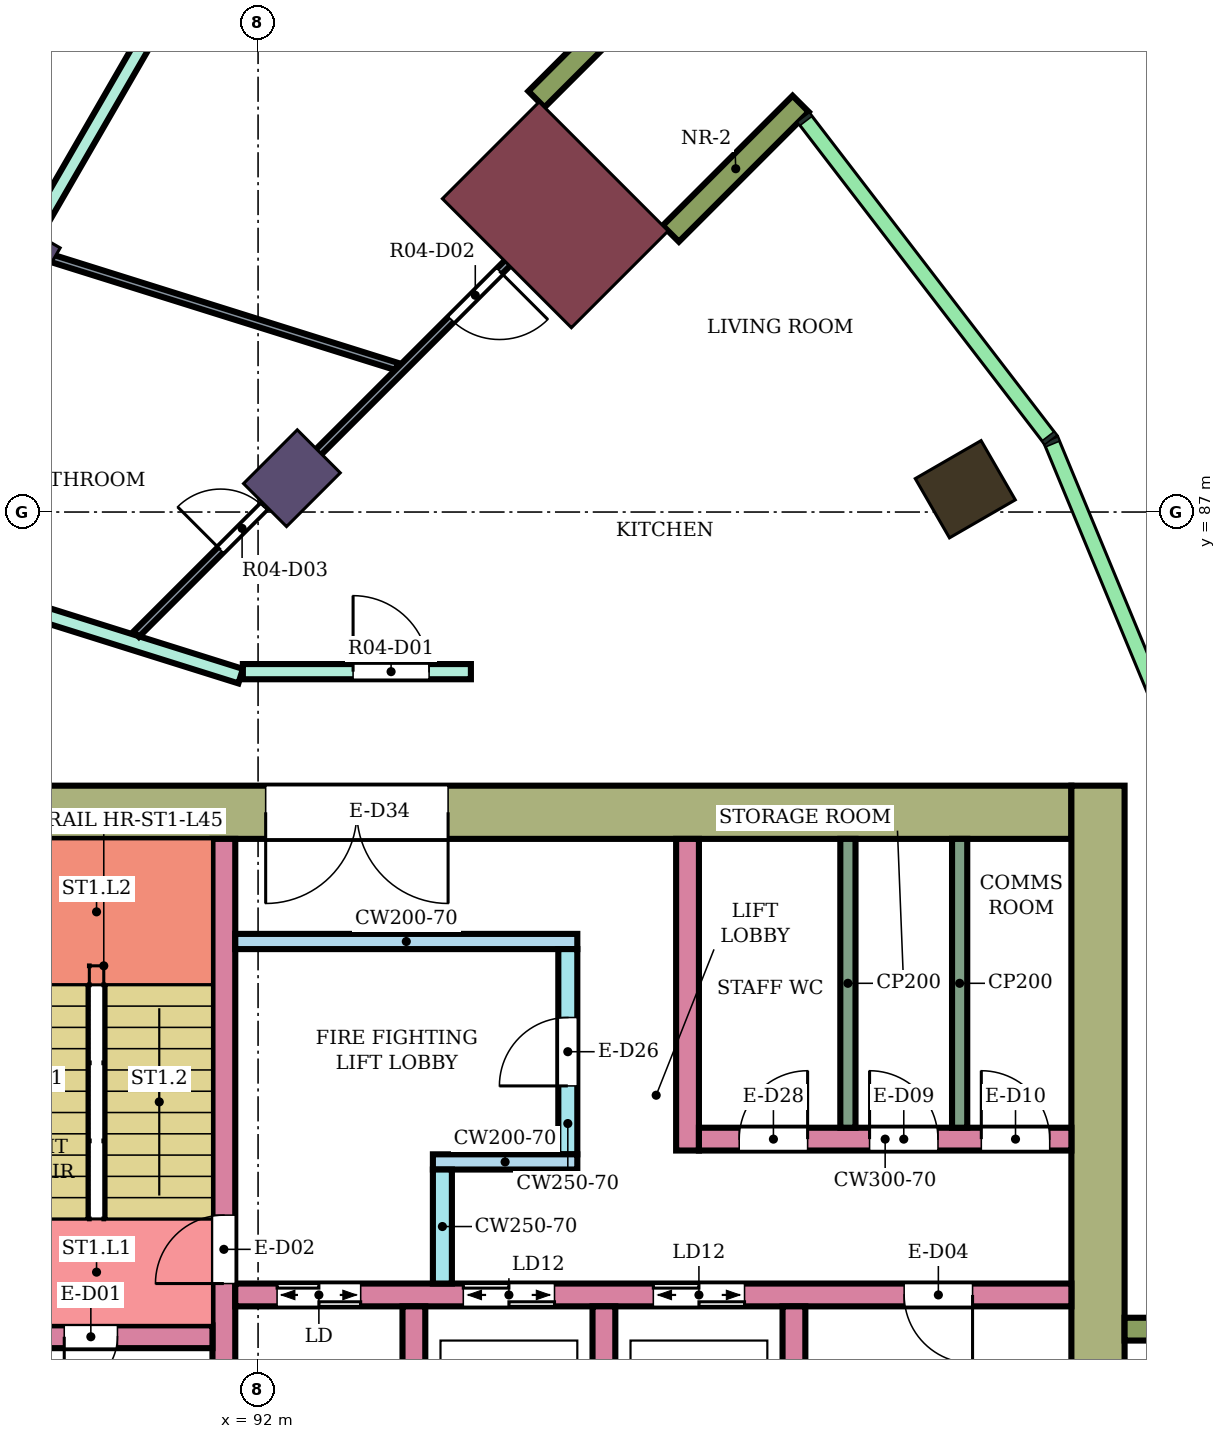
"""IFC4 building model, lengths in metres.
Left out: names, types, materials, properties, quantities, classifications, styles, units other than length and angle.
Written with IfcOpenShell. Run it as: python <this file> out.ifc"""

import sys

from ifc_helpers import new_model, si_unit, direction, frame, frame_2d, origin, origin_2d, place, context, subcontext, project, spatial, rectangle, extrude, element, fill, save


model = new_model("IFC4")
c1 = context("Model", 3, precision=1e-05, world=origin(), true_north=direction((0.0, 1.0)))
c2 = subcontext(c1, "Body", "Model", "MODEL_VIEW")
j1 = project(units=[si_unit("LENGTHUNIT", "METRE"), si_unit("PLANEANGLEUNIT", "RADIAN")], contexts=[c1])
p1 = place(None, origin())
s1 = spatial("IfcSite", under=j1, at=p1, CompositionType="ELEMENT")
p2 = place(p1, origin())
s2 = spatial("IfcBuilding", under=s1, at=p2, CompositionType="ELEMENT")
p3 = place(p2, frame((0.0, 0.0, 194.6)))
s3 = spatial("IfcBuildingStorey", under=s2, at=p3, CompositionType="ELEMENT", Elevation=194.6)
p4 = place(p3, frame((101.304, 87.3, 0.0), z_axis=(0.0, 0.0, 1.0), x_axis=(0.866025403784, 0.5, 0.0)))
e1 = element("IfcColumn", 1, at=p4, inside=s3, PredefinedType="COLUMN", context=c2, shape_type="SweptSolid", body=[
    extrude(rectangle(XDim=1.0, YDim=0.9, at=origin_2d()), origin(), (0.0, 0.0, 1.0), 4.1),
])
for number, where, z_axis, x_axis in (
    (2, (92.445, 87.445, 0.0), (0.0, 0.0, 1.0), (0.707, 0.707, 0.0)),
    (3, (88.8, 90.242, 0.0), (0.0, 0.0, 1.0), (0.5, 0.866, 0.0)),
):
    element("IfcColumn", number, at=place(p3, frame(where, z_axis=z_axis, x_axis=x_axis)), inside=s3, PredefinedType="COLUMN", context=c2, shape_type="SweptSolid", body=[
        extrude(rectangle(XDim=1.0, YDim=0.8, at=origin_2d()), origin(), (0.0, 0.0, 1.0), 4.1),
    ])
p5 = place(p3, frame((95.91, 90.91, 0.0), z_axis=(0.0, 0.0, 1.0), x_axis=(0.707106781187, 0.707106781187, 0.0)))
e4 = element("IfcColumn", 4, at=p5, inside=s3, PredefinedType="COLUMN", context=c2, shape_type="SweptSolid", body=[
    extrude(rectangle(XDim=1.8, YDim=2.4, at=origin_2d()), origin(), (0.0, 0.0, 1.0), 4.1),
])
p6 = place(p3, frame((87.9, 83.05, 0.0), z_axis=(0.0, 0.0, 1.0), x_axis=(1.0, 0.0, 0.0)))
e5 = element("IfcWall", 5, at=p6, inside=s3, PredefinedType="SHEAR", context=c2, shape_type="SweptSolid", body=[
    extrude(rectangle(XDim=14.8, YDim=0.7, at=frame_2d((7.4, 0.0))), origin(), (0.0, 0.0, 1.0), 3.78),
])
p7 = place(p6, frame((4.2, 0.0, 0.0)))
e6 = element("IfcOpeningElement", 6, at=p7, cuts=e5, PredefinedType="OPENING", context=c2, shape_type="SweptSolid", body=[
    extrude(rectangle(XDim=2.4, YDim=2.4, at=frame_2d((1.2, 1.2))), frame((0.0, 0.36, 0.0), z_axis=(0.0, -1.0, 0.0), x_axis=(1.0, 0.0, 0.0)), (0.0, 0.0, 1.0), 0.72),
])
p8 = place(p3, frame((103.05, 66.6, 0.0), z_axis=(0.0, 0.0, 1.0), x_axis=(0.0, 1.0, 0.0)))
e7 = element("IfcWall", 7, at=p8, inside=s3, PredefinedType="SHEAR", context=c2, shape_type="SweptSolid", body=[
    extrude(rectangle(XDim=16.8, YDim=0.7, at=frame_2d((8.4, 0.0))), origin(), (0.0, 0.0, 1.0), 3.78),
])
p9 = place(p3, frame((91.55, 75.0, 0.0), z_axis=(0.0, 0.0, 1.0), x_axis=(0.0, 1.0, 0.0)))
e8 = element("IfcWall", 8, at=p9, inside=s3, PredefinedType="SHEAR", context=c2, shape_type="SweptSolid", body=[
    extrude(rectangle(XDim=7.7, YDim=0.3, at=frame_2d((3.85, 0.0))), origin(), (0.0, 0.0, 1.0), 3.78),
])
p10 = place(p9, frame((1.85, 0.0, 0.0)))
e9 = element("IfcOpeningElement", 9, at=p10, cuts=e8, PredefinedType="OPENING", context=c2, shape_type="SweptSolid", body=[
    extrude(rectangle(XDim=0.9, YDim=2.1, at=frame_2d((0.45, 1.05))), frame((0.0, 0.16, 0.0), z_axis=(0.0, -1.0, 0.0), x_axis=(1.0, 0.0, 0.0)), (0.0, 0.0, 1.0), 0.32),
])
p11 = place(p3, frame((88.35, 76.15, 0.0), z_axis=(0.0, 0.0, 1.0), x_axis=(1.0, 0.0, 0.0)))
e10 = element("IfcWall", 10, at=p11, inside=s3, PredefinedType="SHEAR", context=c2, shape_type="SweptSolid", body=[
    extrude(rectangle(XDim=3.05, YDim=0.3, at=frame_2d((1.525, 0.0))), origin(), (0.0, 0.0, 1.0), 3.78),
])
p12 = place(p11, frame((1.1, 0.0, 0.0)))
e11 = element("IfcOpeningElement", 11, at=p12, cuts=e10, PredefinedType="OPENING", context=c2, shape_type="SweptSolid", body=[
    extrude(rectangle(XDim=0.7, YDim=2.0, at=frame_2d((0.35, 1.0))), frame((0.0, 0.16, 0.0), z_axis=(0.0, -1.0, 0.0), x_axis=(1.0, 0.0, 0.0)), (0.0, 0.0, 1.0), 0.32),
])
p13 = place(p3, frame((91.7, 76.7, 0.0), z_axis=(0.0, 0.0, 1.0), x_axis=(1.0, 0.0, 0.0)))
e12 = element("IfcWall", 12, at=p13, inside=s3, PredefinedType="SHEAR", context=c2, shape_type="SweptSolid", body=[
    extrude(rectangle(XDim=11.0, YDim=0.3, at=frame_2d((5.5, 0.0))), origin(), (0.0, 0.0, 1.0), 3.78),
])
p14 = place(p13, frame((0.55, 0.0, 0.0)))
e13 = element("IfcOpeningElement", 13, at=p14, cuts=e12, PredefinedType="OPENING", context=c2, shape_type="SweptSolid", body=[
    extrude(rectangle(XDim=1.1, YDim=2.1, at=frame_2d((0.55, 1.05))), frame((0.0, 0.16, 0.0), z_axis=(0.0, -1.0, 0.0), x_axis=(1.0, 0.0, 0.0)), (0.0, 0.0, 1.0), 0.32),
])
p15 = place(p13, frame((3.0, 0.0, 0.0)))
e14 = element("IfcOpeningElement", 14, at=p15, cuts=e12, PredefinedType="OPENING", context=c2, shape_type="SweptSolid", body=[
    extrude(rectangle(XDim=1.2, YDim=2.1, at=frame_2d((0.6, 1.05))), frame((0.0, 0.16, 0.0), z_axis=(0.0, -1.0, 0.0), x_axis=(1.0, 0.0, 0.0)), (0.0, 0.0, 1.0), 0.32),
])
p16 = place(p13, frame((5.5, 0.0, 0.0)))
e15 = element("IfcOpeningElement", 15, at=p16, cuts=e12, PredefinedType="OPENING", context=c2, shape_type="SweptSolid", body=[
    extrude(rectangle(XDim=1.2, YDim=2.1, at=frame_2d((0.6, 1.05))), frame((0.0, 0.16, 0.0), z_axis=(0.0, -1.0, 0.0), x_axis=(1.0, 0.0, 0.0)), (0.0, 0.0, 1.0), 0.32),
])
p17 = place(p13, frame((8.8, 0.0, 0.0)))
e16 = element("IfcOpeningElement", 16, at=p17, cuts=e12, PredefinedType="OPENING", context=c2, shape_type="SweptSolid", body=[
    extrude(rectangle(XDim=0.9, YDim=2.1, at=frame_2d((0.45, 1.05))), frame((0.0, 0.16, 0.0), z_axis=(0.0, -1.0, 0.0), x_axis=(1.0, 0.0, 0.0)), (0.0, 0.0, 1.0), 0.32),
])
for number, where, z_axis, x_axis in (
    (17, (94.05, 74.0, 0.0), (0.0, 0.0, 1.0), (0.0, 1.0, 0.0)),
    (18, (96.55, 74.0, 0.0), (0.0, 0.0, 1.0), (0.0, 1.0, 0.0)),
    (19, (99.05, 74.0, 0.0), (0.0, 0.0, 1.0), (0.0, 1.0, 0.0)),
):
    element("IfcWall", number, at=place(p3, frame(where, z_axis=z_axis, x_axis=x_axis)), inside=s3, PredefinedType="SHEAR", context=c2, shape_type="SweptSolid", body=[
        extrude(rectangle(XDim=2.55, YDim=0.3, at=frame_2d((1.275, 0.0))), origin(), (0.0, 0.0, 1.0), 3.78),
    ])
p18 = place(p3, frame((91.7, 81.35, 0.0), z_axis=(0.0, 0.0, 1.0), x_axis=(1.0, 0.0, 0.0)))
e20 = element("IfcWall", 20, at=p18, inside=s3, PredefinedType="SHEAR", context=c2, shape_type="SweptSolid", body=[
    extrude(rectangle(XDim=4.5, YDim=0.2, at=frame_2d((2.25, 0.0))), origin(), (0.0, 0.0, 1.0), 3.78),
])
p19 = place(p3, frame((96.075, 78.55, 0.0), z_axis=(0.0, 0.0, 1.0), x_axis=(0.0, 1.0, 0.0)))
e21 = element("IfcWall", 21, at=p19, inside=s3, PredefinedType="SHEAR", context=c2, shape_type="SweptSolid", body=[
    extrude(rectangle(XDim=2.7, YDim=0.25, at=frame_2d((1.35, 0.0))), origin(), (0.0, 0.0, 1.0), 3.78),
])
p20 = place(p19, frame((0.9, 0.0, 0.0)))
e22 = element("IfcOpeningElement", 22, at=p20, cuts=e21, PredefinedType="OPENING", context=c2, shape_type="SweptSolid", body=[
    extrude(rectangle(XDim=0.9, YDim=2.1, at=frame_2d((0.45, 1.05))), frame((0.0, 0.135, 0.0), z_axis=(0.0, -1.0, 0.0), x_axis=(1.0, 0.0, 0.0)), (0.0, 0.0, 1.0), 0.27),
])
p21 = place(p3, frame((94.3, 78.45, 0.0), z_axis=(0.0, 0.0, 1.0), x_axis=(1.0, 0.0, 0.0)))
e23 = element("IfcWall", 23, at=p21, inside=s3, PredefinedType="SHEAR", context=c2, shape_type="SweptSolid", body=[
    extrude(rectangle(XDim=1.9, YDim=0.2, at=frame_2d((0.95, 0.0))), origin(), (0.0, 0.0, 1.0), 3.78),
])
p22 = place(p3, frame((94.425, 76.85, 0.0), z_axis=(0.0, 0.0, 1.0), x_axis=(0.0, 1.0, 0.0)))
e24 = element("IfcWall", 24, at=p22, inside=s3, PredefinedType="SHEAR", context=c2, shape_type="SweptSolid", body=[
    extrude(rectangle(XDim=1.5, YDim=0.25, at=frame_2d((0.75, 0.0))), origin(), (0.0, 0.0, 1.0), 3.78),
])
p23 = place(p3, frame((97.65, 78.6, 0.0), z_axis=(0.0, 0.0, 1.0), x_axis=(0.0, 1.0, 0.0)))
e25 = element("IfcWall", 25, at=p23, inside=s3, PredefinedType="SHEAR", context=c2, shape_type="SweptSolid", body=[
    extrude(rectangle(XDim=4.1, YDim=0.3, at=frame_2d((2.05, 0.0))), origin(), (0.0, 0.0, 1.0), 3.78),
])
p24 = place(p3, frame((97.8, 78.75, 0.0), z_axis=(0.0, 0.0, 1.0), x_axis=(1.0, 0.0, 0.0)))
e26 = element("IfcWall", 26, at=p24, inside=s3, PredefinedType="SHEAR", context=c2, shape_type="SweptSolid", body=[
    extrude(rectangle(XDim=4.9, YDim=0.3, at=frame_2d((2.45, 0.0))), origin(), (0.0, 0.0, 1.0), 3.78),
])
p25 = place(p24, frame((0.53, 0.0, 0.0)))
e27 = element("IfcOpeningElement", 27, at=p25, cuts=e26, PredefinedType="OPENING", context=c2, shape_type="SweptSolid", body=[
    extrude(rectangle(XDim=0.9, YDim=2.1, at=frame_2d((0.45, 1.05))), frame((0.0, 0.16, 0.0), z_axis=(0.0, -1.0, 0.0), x_axis=(1.0, 0.0, 0.0)), (0.0, 0.0, 1.0), 0.32),
])
p26 = place(p24, frame((2.245, 0.0, 0.0)))
e28 = element("IfcOpeningElement", 28, at=p26, cuts=e26, PredefinedType="OPENING", context=c2, shape_type="SweptSolid", body=[
    extrude(rectangle(XDim=0.9, YDim=2.1, at=frame_2d((0.45, 1.05))), frame((0.0, 0.16, 0.0), z_axis=(0.0, -1.0, 0.0), x_axis=(1.0, 0.0, 0.0)), (0.0, 0.0, 1.0), 0.32),
])
p27 = place(p24, frame((3.715, 0.0, 0.0)))
e29 = element("IfcOpeningElement", 29, at=p27, cuts=e26, PredefinedType="OPENING", context=c2, shape_type="SweptSolid", body=[
    extrude(rectangle(XDim=0.9, YDim=2.1, at=frame_2d((0.45, 1.05))), frame((0.0, 0.16, 0.0), z_axis=(0.0, -1.0, 0.0), x_axis=(1.0, 0.0, 0.0)), (0.0, 0.0, 1.0), 0.32),
])
for number, where, z_axis, x_axis in (
    (30, (103.4, 76.25, 0.0), (0.0, 0.0, 1.0), (1.0, 0.0, 0.0)),
    (31, (97.43, 90.662, 0.0), (0.0, 0.0, 1.0), (0.707, 0.707, 0.0)),
    (32, (95.662, 92.43, 0.0), (0.0, 0.0, 1.0), (0.707, 0.707, 0.0)),
):
    element("IfcWall", number, at=place(p3, frame(where, z_axis=z_axis, x_axis=x_axis)), inside=s3, PredefinedType="NOTDEFINED", context=c2, shape_type="SweptSolid", body=[
        extrude(rectangle(XDim=2.416, YDim=0.3, at=frame_2d((1.208, 0.0))), origin(), (0.0, 0.0, 1.0), 4.1),
    ])
p28 = place(p3, frame((86.313, 86.554, 0.0), z_axis=(0.0, 0.0, 1.0), x_axis=(0.954081217458, -0.299548043717, 0.0)))
e33 = element("IfcWall", 33, at=p28, inside=s3, PredefinedType="PARTITIONING", context=c2, shape_type="SweptSolid", body=[
    extrude(rectangle(XDim=5.721, YDim=0.2, at=frame_2d((2.86, 0.0))), origin(), (0.0, 0.0, 1.0), 3.65),
])
p29 = place(p3, frame((86.676, 86.563, 0.0), z_axis=(0.0, 0.0, 1.0), x_axis=(0.500124310661, 0.865953621094, 0.0)))
e34 = element("IfcWall", 34, at=p29, inside=s3, PredefinedType="PARTITIONING", context=c2, shape_type="SweptSolid", body=[
    extrude(rectangle(XDim=12.446, YDim=0.2, at=frame_2d((6.223, 0.0))), origin(), (0.0, 0.0, 1.0), 3.65),
])
p30 = place(p3, frame((91.8, 84.9, 0.0), z_axis=(0.0, 0.0, 1.0), x_axis=(1.0, 0.0, 0.0)))
e35 = element("IfcWall", 35, at=p30, inside=s3, PredefinedType="PARTITIONING", context=c2, shape_type="SweptSolid", body=[
    extrude(rectangle(XDim=3.0, YDim=0.2, at=frame_2d((1.5, 0.0))), origin(), (0.0, 0.0, 1.0), 3.65),
])
p31 = place(p30, frame((1.45, 0.0, 0.0)))
e36 = element("IfcOpeningElement", 36, at=p31, cuts=e35, PredefinedType="OPENING", context=c2, shape_type="SweptSolid", body=[
    extrude(rectangle(XDim=1.0, YDim=2.1, at=frame_2d((0.5, 1.05))), frame((0.0, 0.11, 0.0), z_axis=(0.0, -1.0, 0.0), x_axis=(1.0, 0.0, 0.0)), (0.0, 0.0, 1.0), 0.22),
])
p32 = place(p3, frame((89.026, 90.419, 0.0), z_axis=(0.0, 0.0, 1.0), x_axis=(0.954217944154, -0.299112211476, 0.0)))
e37 = element("IfcWall", 37, at=p32, inside=s3, PredefinedType="PARTITIONING", context=c2, shape_type="SweptSolid", body=[
    extrude(rectangle(XDim=5.03, YDim=0.1, at=frame_2d((2.515, 0.0))), origin(), (0.0, 0.0, 1.0), 3.65),
])
p33 = place(p3, frame((90.397, 85.393, 0.0), z_axis=(0.0, 0.0, 1.0), x_axis=(0.707264750546, 0.706948776529, 0.0)))
e38 = element("IfcWall", 38, at=p33, inside=s3, PredefinedType="PARTITIONING", context=c2, shape_type="SweptSolid", body=[
    extrude(rectangle(XDim=8.499, YDim=0.1, at=frame_2d((4.25, 0.0))), origin(), (0.0, 0.0, 1.0), 3.65),
])
p34 = place(p33, frame((5.857, 0.0, 0.0)))
e39 = element("IfcOpeningElement", 39, at=p34, cuts=e38, PredefinedType="OPENING", context=c2, shape_type="SweptSolid", body=[
    extrude(rectangle(XDim=0.9, YDim=2.1, at=frame_2d((0.45, 1.05))), frame((0.0, 0.06, 0.0), z_axis=(0.0, -1.0, 0.0), x_axis=(1.0, 0.0, 0.0)), (0.0, 0.0, 1.0), 0.12),
])
p35 = place(p33, frame((1.569, 0.0, 0.0)))
e40 = element("IfcOpeningElement", 40, at=p35, cuts=e38, PredefinedType="OPENING", context=c2, shape_type="SweptSolid", body=[
    extrude(rectangle(XDim=0.8, YDim=2.1, at=frame_2d((0.4, 1.05))), frame((0.0, 0.06, 0.0), z_axis=(0.0, -1.0, 0.0), x_axis=(1.0, 0.0, 0.0)), (0.0, 0.0, 1.0), 0.12),
])
for number, where, z_axis, x_axis in (
    (41, (99.76, 78.9, 0.0), (0.0, 0.0, 1.0), (0.0, 1.0, 0.0)),
    (42, (101.23, 78.9, 0.0), (0.0, 0.0, 1.0), (0.0, 1.0, 0.0)),
):
    element("IfcWall", number, at=place(p3, frame(where, z_axis=z_axis, x_axis=x_axis)), inside=s3, PredefinedType="PARTITIONING", context=c2, shape_type="SweptSolid", body=[
        extrude(rectangle(XDim=3.8, YDim=0.2, at=frame_2d((1.9, 0.0))), origin(), (0.0, 0.0, 1.0), 3.78),
    ])
p36 = place(p31, origin())
e43 = element("IfcDoor", 43, at=p36, inside=s3, OperationType="SINGLE_SWING_LEFT", PredefinedType="DOOR", context=c2, shape_type="SweptSolid", body=[
    extrude(rectangle(XDim=1.0, YDim=2.1, at=frame_2d((0.5, 1.05))), frame((0.0, 0.025, 0.0), z_axis=(0.0, -1.0, 0.0), x_axis=(1.0, 0.0, 0.0)), (0.0, 0.0, 1.0), 0.05),
])
fill(e36, e43)
p37 = place(p34, frame((0.9, 0.0, 0.0), z_axis=(0.0, 0.0, 1.0), x_axis=(-1.0, 0.0, 0.0)))
e44 = element("IfcDoor", 44, at=p37, inside=s3, OperationType="SINGLE_SWING_LEFT", PredefinedType="DOOR", context=c2, shape_type="SweptSolid", body=[
    extrude(rectangle(XDim=0.9, YDim=2.1, at=frame_2d((0.45, 1.05))), frame((0.0, 0.025, 0.0), z_axis=(0.0, -1.0, 0.0), x_axis=(1.0, 0.0, 0.0)), (0.0, 0.0, 1.0), 0.05),
])
fill(e39, e44)
p38 = place(p35, origin())
e45 = element("IfcDoor", 45, at=p38, inside=s3, OperationType="SINGLE_SWING_LEFT", PredefinedType="DOOR", context=c2, shape_type="SweptSolid", body=[
    extrude(rectangle(XDim=0.8, YDim=2.1, at=frame_2d((0.4, 1.05))), frame((0.0, 0.025, 0.0), z_axis=(0.0, -1.0, 0.0), x_axis=(1.0, 0.0, 0.0)), (0.0, 0.0, 1.0), 0.05),
])
fill(e40, e45)
p39 = place(p12, frame((0.7, 0.0, 0.0), z_axis=(0.0, 0.0, 1.0), x_axis=(-1.0, 0.0, 0.0)))
e46 = element("IfcDoor", 46, at=p39, inside=s3, OperationType="SINGLE_SWING_RIGHT", PredefinedType="DOOR", context=c2, shape_type="SweptSolid", body=[
    extrude(rectangle(XDim=0.7, YDim=2.0, at=frame_2d((0.35, 1.0))), frame((0.0, 0.025, 0.0), z_axis=(0.0, -1.0, 0.0), x_axis=(1.0, 0.0, 0.0)), (0.0, 0.0, 1.0), 0.05),
])
fill(e11, e46)
p40 = place(p10, origin())
e47 = element("IfcDoor", 47, at=p40, inside=s3, OperationType="SINGLE_SWING_LEFT", PredefinedType="DOOR", context=c2, shape_type="SweptSolid", body=[
    extrude(rectangle(XDim=0.9, YDim=2.1, at=frame_2d((0.45, 1.05))), frame((0.0, 0.025, 0.0), z_axis=(0.0, -1.0, 0.0), x_axis=(1.0, 0.0, 0.0)), (0.0, 0.0, 1.0), 0.05),
])
fill(e9, e47)
p41 = place(p14, origin())
e48 = element("IfcDoor", 48, at=p41, inside=s3, OperationType="DOUBLE_DOOR_SLIDING", PredefinedType="DOOR", context=c2, shape_type="SweptSolid", body=[
    extrude(rectangle(XDim=1.1, YDim=2.1, at=frame_2d((0.55, 1.05))), frame((0.0, 0.025, 0.0), z_axis=(0.0, -1.0, 0.0), x_axis=(1.0, 0.0, 0.0)), (0.0, 0.0, 1.0), 0.05),
])
fill(e13, e48)
p42 = place(p15, origin())
e49 = element("IfcDoor", 49, at=p42, inside=s3, OperationType="DOUBLE_DOOR_SLIDING", PredefinedType="DOOR", context=c2, shape_type="SweptSolid", body=[
    extrude(rectangle(XDim=1.2, YDim=2.1, at=frame_2d((0.6, 1.05))), frame((0.0, 0.025, 0.0), z_axis=(0.0, -1.0, 0.0), x_axis=(1.0, 0.0, 0.0)), (0.0, 0.0, 1.0), 0.05),
])
fill(e14, e49)
p43 = place(p16, origin())
e50 = element("IfcDoor", 50, at=p43, inside=s3, OperationType="DOUBLE_DOOR_SLIDING", PredefinedType="DOOR", context=c2, shape_type="SweptSolid", body=[
    extrude(rectangle(XDim=1.2, YDim=2.1, at=frame_2d((0.6, 1.05))), frame((0.0, 0.025, 0.0), z_axis=(0.0, -1.0, 0.0), x_axis=(1.0, 0.0, 0.0)), (0.0, 0.0, 1.0), 0.05),
])
fill(e15, e50)
p44 = place(p17, frame((0.9, 0.0, 0.0), z_axis=(0.0, 0.0, 1.0), x_axis=(-1.0, 0.0, 0.0)))
e51 = element("IfcDoor", 51, at=p44, inside=s3, OperationType="SINGLE_SWING_LEFT", PredefinedType="DOOR", context=c2, shape_type="SweptSolid", body=[
    extrude(rectangle(XDim=0.9, YDim=2.1, at=frame_2d((0.45, 1.05))), frame((0.0, 0.025, 0.0), z_axis=(0.0, -1.0, 0.0), x_axis=(1.0, 0.0, 0.0)), (0.0, 0.0, 1.0), 0.05),
])
fill(e16, e51)
p45 = place(p20, origin())
e52 = element("IfcDoor", 52, at=p45, inside=s3, OperationType="SINGLE_SWING_LEFT", PredefinedType="DOOR", context=c2, shape_type="SweptSolid", body=[
    extrude(rectangle(XDim=0.9, YDim=2.1, at=frame_2d((0.45, 1.05))), frame((0.0, 0.025, 0.0), z_axis=(0.0, -1.0, 0.0), x_axis=(1.0, 0.0, 0.0)), (0.0, 0.0, 1.0), 0.05),
])
fill(e22, e52)
p46 = place(p25, origin())
e53 = element("IfcDoor", 53, at=p46, inside=s3, OperationType="SINGLE_SWING_RIGHT", PredefinedType="DOOR", context=c2, shape_type="SweptSolid", body=[
    extrude(rectangle(XDim=0.9, YDim=2.1, at=frame_2d((0.45, 1.05))), frame((0.0, 0.025, 0.0), z_axis=(0.0, -1.0, 0.0), x_axis=(1.0, 0.0, 0.0)), (0.0, 0.0, 1.0), 0.05),
])
fill(e27, e53)
p47 = place(p26, origin())
e54 = element("IfcDoor", 54, at=p47, inside=s3, OperationType="SINGLE_SWING_LEFT", PredefinedType="DOOR", context=c2, shape_type="SweptSolid", body=[
    extrude(rectangle(XDim=0.9, YDim=2.1, at=frame_2d((0.45, 1.05))), frame((0.0, 0.025, 0.0), z_axis=(0.0, -1.0, 0.0), x_axis=(1.0, 0.0, 0.0)), (0.0, 0.0, 1.0), 0.05),
])
fill(e28, e54)
p48 = place(p27, origin())
e55 = element("IfcDoor", 55, at=p48, inside=s3, OperationType="SINGLE_SWING_LEFT", PredefinedType="DOOR", context=c2, shape_type="SweptSolid", body=[
    extrude(rectangle(XDim=0.9, YDim=2.1, at=frame_2d((0.45, 1.05))), frame((0.0, 0.025, 0.0), z_axis=(0.0, -1.0, 0.0), x_axis=(1.0, 0.0, 0.0)), (0.0, 0.0, 1.0), 0.05),
])
fill(e29, e55)
p49 = place(p7, frame((2.4, 0.0, 0.0), z_axis=(0.0, 0.0, 1.0), x_axis=(-1.0, 0.0, 0.0)))
e56 = element("IfcDoor", 56, at=p49, inside=s3, OperationType="DOUBLE_DOOR_SINGLE_SWING", PredefinedType="DOOR", context=c2, shape_type="SweptSolid", body=[
    extrude(rectangle(XDim=2.4, YDim=2.4, at=frame_2d((1.2, 1.2))), frame((0.0, 0.025, 0.0), z_axis=(0.0, -1.0, 0.0), x_axis=(1.0, 0.0, 0.0)), (0.0, 0.0, 1.0), 0.05),
])
fill(e6, e56)
save(model, sys.argv[1])
